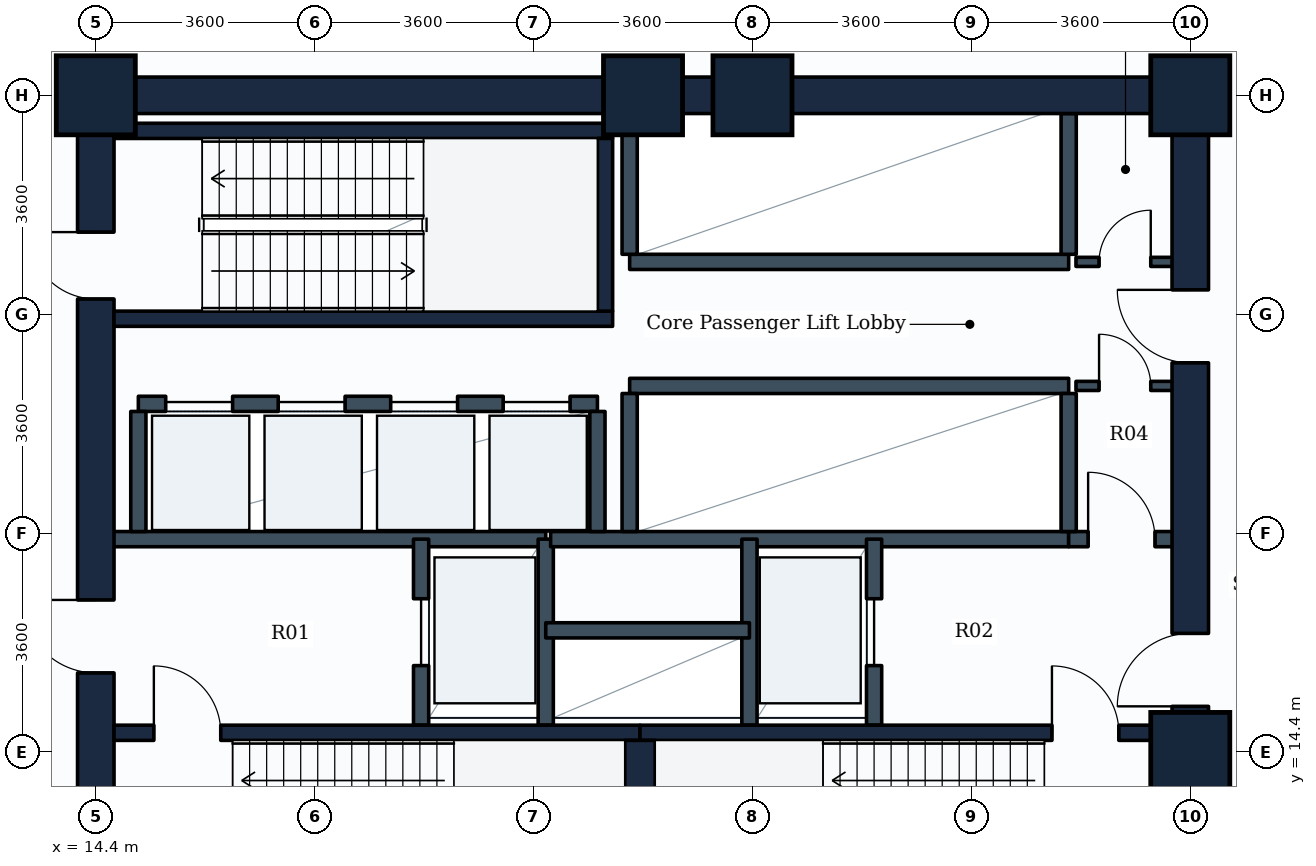
"""IFC4 building model, lengths in metres.
Left out: names, types, materials, properties, quantities, classifications, styles, units other than length and angle.
Written with IfcOpenShell. Run it as: python <this file> out.ifc"""

import sys

from ifc_helpers import new_model, si_unit, direction, frame, frame_2d, origin, origin_2d, place, context, subcontext, project, spatial, rectangle, extrude, element, fill, save


model = new_model("IFC4")
c1 = context("Model", 3, precision=1e-05, world=origin(), true_north=direction((0.0, 1.0)))
c2 = subcontext(c1, "Body", "Model", "MODEL_VIEW")
j1 = project(units=[si_unit("LENGTHUNIT", "METRE"), si_unit("PLANEANGLEUNIT", "RADIAN")], contexts=[c1])
p1 = place(None, origin())
s1 = spatial("IfcSite", under=j1, at=p1, CompositionType="ELEMENT")
p2 = place(p1, origin())
s2 = spatial("IfcBuilding", under=s1, at=p2, CompositionType="ELEMENT")
p3 = place(p2, frame((0.0, 0.0, 10.2)))
s3 = spatial("IfcBuildingStorey", under=s2, at=p3, CompositionType="ELEMENT", Elevation=10.2)
for number, where, z_axis, x_axis in (
    (1, (14.4, 25.2, 0.0), (0.0, 0.0, 1.0), (1.0, 0.0, 0.0)),
    (2, (23.4, 25.2, 0.0), (0.0, 0.0, 1.0), (1.0, 0.0, 0.0)),
    (3, (25.2, 25.2, 0.0), (0.0, 0.0, 1.0), (1.0, 0.0, 0.0)),
    (4, (32.4, 14.4, 0.0), (0.0, 0.0, 1.0), (1.0, 0.0, 0.0)),
    (5, (32.4, 25.2, 0.0), (0.0, 0.0, 1.0), (1.0, 0.0, 0.0)),
):
    element("IfcColumn", number, at=place(p3, frame(where, z_axis=z_axis, x_axis=x_axis)), inside=s3, PredefinedType="COLUMN", context=c2, shape_type="SweptSolid", body=[
        extrude(rectangle(XDim=1.3, YDim=1.3, at=origin_2d()), origin(), (0.0, 0.0, 1.0), 4.6),
    ])
p4 = place(p3, frame((14.4, 25.2, 0.0), z_axis=(0.0, 0.0, 1.0), x_axis=(1.0, 0.0, 0.0)))
e6 = element("IfcWall", 6, at=p4, inside=s3, PredefinedType="SHEAR", context=c2, shape_type="SweptSolid", body=[
    extrude(rectangle(XDim=18.0, YDim=0.6, at=frame_2d((9.0, 0.0))), origin(), (0.0, 0.0, 1.0), 4.3),
])
p5 = place(p3, frame((14.4, 10.8, 0.0), z_axis=(0.0, 0.0, 1.0), x_axis=(0.0, 1.0, 0.0)))
e7 = element("IfcWall", 7, at=p5, inside=s3, PredefinedType="SHEAR", context=c2, shape_type="SweptSolid", body=[
    extrude(rectangle(XDim=14.4, YDim=0.6, at=frame_2d((7.2, 0.0))), origin(), (0.0, 0.0, 1.0), 4.3),
])
p6 = place(p5, frame((11.05, 0.0, 0.0)))
e8 = element("IfcOpeningElement", 8, at=p6, cuts=e7, PredefinedType="OPENING", context=c2, shape_type="SweptSolid", body=[
    extrude(rectangle(XDim=1.1, YDim=2.1, at=frame_2d((0.55, 1.05))), frame((0.0, 0.31, 0.0), z_axis=(0.0, -1.0, 0.0), x_axis=(1.0, 0.0, 0.0)), (0.0, 0.0, 1.0), 0.62),
])
p7 = place(p5, frame((4.9, 0.0, 0.0)))
e9 = element("IfcOpeningElement", 9, at=p7, cuts=e7, PredefinedType="OPENING", context=c2, shape_type="SweptSolid", body=[
    extrude(rectangle(XDim=1.2, YDim=2.1, at=frame_2d((0.6, 1.05))), frame((0.0, 0.31, 0.0), z_axis=(0.0, -1.0, 0.0), x_axis=(1.0, 0.0, 0.0)), (0.0, 0.0, 1.0), 0.62),
])
p8 = place(p3, frame((32.4, 10.8, 0.0), z_axis=(0.0, 0.0, 1.0), x_axis=(0.0, 1.0, 0.0)))
e10 = element("IfcWall", 10, at=p8, inside=s3, PredefinedType="SHEAR", context=c2, shape_type="SweptSolid", body=[
    extrude(rectangle(XDim=14.4, YDim=0.6, at=frame_2d((7.2, 0.0))), origin(), (0.0, 0.0, 1.0), 4.3),
])
p9 = place(p8, frame((4.35, 0.0, 0.0)))
e11 = element("IfcOpeningElement", 11, at=p9, cuts=e10, PredefinedType="OPENING", context=c2, shape_type="SweptSolid", body=[
    extrude(rectangle(XDim=1.2, YDim=2.1, at=frame_2d((0.6, 1.05))), frame((0.0, 0.31, 0.0), z_axis=(0.0, -1.0, 0.0), x_axis=(1.0, 0.0, 0.0)), (0.0, 0.0, 1.0), 0.62),
])
p10 = place(p8, frame((10.0, 0.0, 0.0)))
e12 = element("IfcOpeningElement", 12, at=p10, cuts=e10, PredefinedType="OPENING", context=c2, shape_type="SweptSolid", body=[
    extrude(rectangle(XDim=1.2, YDim=2.1, at=frame_2d((0.6, 1.05))), frame((0.0, 0.31, 0.0), z_axis=(0.0, -1.0, 0.0), x_axis=(1.0, 0.0, 0.0)), (0.0, 0.0, 1.0), 0.62),
])
p11 = place(p3, frame((14.7, 14.715, 0.0), z_axis=(0.0, 0.0, 1.0), x_axis=(1.0, 0.0, 0.0)))
e13 = element("IfcWall", 13, at=p11, inside=s3, PredefinedType="SHEAR", context=c2, shape_type="SweptSolid", body=[
    extrude(rectangle(XDim=8.65, YDim=0.25, at=frame_2d((4.325, 0.0))), origin(), (0.0, 0.0, 1.0), 4.3),
])
p12 = place(p11, frame((0.655, 0.0, 0.0)))
e14 = element("IfcOpeningElement", 14, at=p12, cuts=e13, PredefinedType="OPENING", context=c2, shape_type="SweptSolid", body=[
    extrude(rectangle(XDim=1.1, YDim=2.1, at=frame_2d((0.55, 1.05))), frame((0.0, 0.135, 0.0), z_axis=(0.0, -1.0, 0.0), x_axis=(1.0, 0.0, 0.0)), (0.0, 0.0, 1.0), 0.27),
])
p13 = place(p3, frame((23.35, 14.715, 0.0), z_axis=(0.0, 0.0, 1.0), x_axis=(1.0, 0.0, 0.0)))
e15 = element("IfcWall", 15, at=p13, inside=s3, PredefinedType="SHEAR", context=c2, shape_type="SweptSolid", body=[
    extrude(rectangle(XDim=8.75, YDim=0.25, at=frame_2d((4.375, 0.0))), origin(), (0.0, 0.0, 1.0), 4.3),
])
p14 = place(p13, frame((6.775, 0.0, 0.0)))
e16 = element("IfcOpeningElement", 16, at=p14, cuts=e15, PredefinedType="OPENING", context=c2, shape_type="SweptSolid", body=[
    extrude(rectangle(XDim=1.1, YDim=2.1, at=frame_2d((0.55, 1.05))), frame((0.0, 0.135, 0.0), z_axis=(0.0, -1.0, 0.0), x_axis=(1.0, 0.0, 0.0)), (0.0, 0.0, 1.0), 0.27),
])
p15 = place(p3, frame((23.35, 11.75, 0.0), z_axis=(0.0, 0.0, 1.0), x_axis=(0.0, 1.0, 0.0)))
e17 = element("IfcWall", 17, at=p15, inside=s3, PredefinedType="SHEAR", context=c2, shape_type="SweptSolid", body=[
    extrude(rectangle(XDim=2.84, YDim=0.5, at=frame_2d((1.42, 0.0))), origin(), (0.0, 0.0, 1.0), 4.3),
])
for number, where, z_axis, x_axis in (
    (18, (14.7, 21.525, 0.0), (0.0, 0.0, 1.0), (1.0, 0.0, 0.0)),
    (19, (14.7, 24.615, 0.0), (0.0, 0.0, 1.0), (1.0, 0.0, 0.0)),
):
    element("IfcWall", number, at=place(p3, frame(where, z_axis=z_axis, x_axis=x_axis)), inside=s3, PredefinedType="SHEAR", context=c2, shape_type="SweptSolid", body=[
        extrude(rectangle(XDim=8.2, YDim=0.25, at=frame_2d((4.1, 0.0))), origin(), (0.0, 0.0, 1.0), 4.3),
    ])
p16 = place(p3, frame((22.775, 21.65, 0.0), z_axis=(0.0, 0.0, 1.0), x_axis=(0.0, 1.0, 0.0)))
e20 = element("IfcWall", 20, at=p16, inside=s3, PredefinedType="SHEAR", context=c2, shape_type="SweptSolid", body=[
    extrude(rectangle(XDim=2.84, YDim=0.25, at=frame_2d((1.42, 0.0))), origin(), (0.0, 0.0, 1.0), 4.3),
])
p17 = place(p3, frame((14.65, 17.9, 0.0), z_axis=(0.0, 0.0, 1.0), x_axis=(1.0, 0.0, 0.0)))
e21 = element("IfcWall", 21, at=p17, inside=s3, PredefinedType="PARTITIONING", context=c2, shape_type="SweptSolid", body=[
    extrude(rectangle(XDim=7.15, YDim=0.25, at=frame_2d((3.575, 0.0))), origin(), (0.0, 0.0, 1.0), 4.285),
])
p18 = place(p3, frame((19.75, 14.84, 0.0), z_axis=(0.0, 0.0, 1.0), x_axis=(0.0, 1.0, 0.0)))
e22 = element("IfcWall", 22, at=p18, inside=s3, PredefinedType="PARTITIONING", context=c2, shape_type="SweptSolid", body=[
    extrude(rectangle(XDim=3.06, YDim=0.25, at=frame_2d((1.53, 0.0))), origin(), (0.0, 0.0, 1.0), 4.285),
])
p19 = place(p18, frame((0.98, 0.0, 0.0)))
e23 = element("IfcOpeningElement", 23, at=p19, cuts=e22, PredefinedType="OPENING", context=c2, shape_type="SweptSolid", body=[
    extrude(rectangle(XDim=1.1, YDim=2.1, at=frame_2d((0.55, 1.05))), frame((0.0, 0.135, 0.0), z_axis=(0.0, -1.0, 0.0), x_axis=(1.0, 0.0, 0.0)), (0.0, 0.0, 1.0), 0.27),
])
p20 = place(p3, frame((21.8, 14.84, 0.0), z_axis=(0.0, 0.0, 1.0), x_axis=(0.0, 1.0, 0.0)))
e24 = element("IfcWall", 24, at=p20, inside=s3, PredefinedType="PARTITIONING", context=c2, shape_type="SweptSolid", body=[
    extrude(rectangle(XDim=3.06, YDim=0.25, at=frame_2d((1.53, 0.0))), origin(), (0.0, 0.0, 1.0), 4.285),
])
p21 = place(p3, frame((21.88, 17.9, 0.0), z_axis=(0.0, 0.0, 1.0), x_axis=(1.0, 0.0, 0.0)))
e25 = element("IfcWall", 25, at=p21, inside=s3, PredefinedType="PARTITIONING", context=c2, shape_type="SweptSolid", body=[
    extrude(rectangle(XDim=8.52, YDim=0.25, at=frame_2d((4.26, 0.0))), origin(), (0.0, 0.0, 1.0), 4.285),
])
p22 = place(p3, frame((30.4, 17.9, 0.0), z_axis=(0.0, 0.0, 1.0), x_axis=(1.0, 0.0, 0.0)))
e26 = element("IfcWall", 26, at=p22, inside=s3, PredefinedType="PARTITIONING", context=c2, shape_type="SweptSolid", body=[
    extrude(rectangle(XDim=1.75, YDim=0.25, at=frame_2d((0.875, 0.0))), origin(), (0.0, 0.0, 1.0), 4.285),
])
p23 = place(p22, frame((0.32, 0.0, 0.0)))
e27 = element("IfcOpeningElement", 27, at=p23, cuts=e26, PredefinedType="OPENING", context=c2, shape_type="SweptSolid", body=[
    extrude(rectangle(XDim=1.1, YDim=2.1, at=frame_2d((0.55, 1.05))), frame((0.0, 0.135, 0.0), z_axis=(0.0, -1.0, 0.0), x_axis=(1.0, 0.0, 0.0)), (0.0, 0.0, 1.0), 0.27),
])
p24 = place(p3, frame((25.15, 14.84, 0.0), z_axis=(0.0, 0.0, 1.0), x_axis=(0.0, 1.0, 0.0)))
e28 = element("IfcWall", 28, at=p24, inside=s3, PredefinedType="PARTITIONING", context=c2, shape_type="SweptSolid", body=[
    extrude(rectangle(XDim=3.06, YDim=0.25, at=frame_2d((1.53, 0.0))), origin(), (0.0, 0.0, 1.0), 4.285),
])
p25 = place(p3, frame((27.2, 14.84, 0.0), z_axis=(0.0, 0.0, 1.0), x_axis=(0.0, 1.0, 0.0)))
e29 = element("IfcWall", 29, at=p25, inside=s3, PredefinedType="PARTITIONING", context=c2, shape_type="SweptSolid", body=[
    extrude(rectangle(XDim=3.06, YDim=0.25, at=frame_2d((1.53, 0.0))), origin(), (0.0, 0.0, 1.0), 4.285),
])
p26 = place(p25, frame((0.98, 0.0, 0.0)))
e30 = element("IfcOpeningElement", 30, at=p26, cuts=e29, PredefinedType="OPENING", context=c2, shape_type="SweptSolid", body=[
    extrude(rectangle(XDim=1.1, YDim=2.1, at=frame_2d((0.55, 1.05))), frame((0.0, 0.135, 0.0), z_axis=(0.0, -1.0, 0.0), x_axis=(1.0, 0.0, 0.0)), (0.0, 0.0, 1.0), 0.27),
])
p27 = place(p3, frame((21.8, 16.4, 0.0), z_axis=(0.0, 0.0, 1.0), x_axis=(1.0, 0.0, 0.0)))
e31 = element("IfcWall", 31, at=p27, inside=s3, PredefinedType="PARTITIONING", context=c2, shape_type="SweptSolid", body=[
    extrude(rectangle(XDim=3.35, YDim=0.25, at=frame_2d((1.675, 0.0))), origin(), (0.0, 0.0, 1.0), 4.285),
])
p28 = place(p3, frame((15.1, 20.125, 0.0), z_axis=(0.0, 0.0, 1.0), x_axis=(1.0, 0.0, 0.0)))
e32 = element("IfcWall", 32, at=p28, inside=s3, PredefinedType="PARTITIONING", context=c2, shape_type="SweptSolid", body=[
    extrude(rectangle(XDim=7.55, YDim=0.25, at=frame_2d((3.775, 0.0))), origin(), (0.0, 0.0, 1.0), 4.285),
])
p29 = place(p28, frame((0.45, 0.0, 0.0)))
e33 = element("IfcOpeningElement", 33, at=p29, cuts=e32, PredefinedType="OPENING", context=c2, shape_type="SweptSolid", body=[
    extrude(rectangle(XDim=1.1, YDim=2.1, at=frame_2d((0.55, 1.05))), frame((0.0, 0.135, 0.0), z_axis=(0.0, -1.0, 0.0), x_axis=(1.0, 0.0, 0.0)), (0.0, 0.0, 1.0), 0.27),
])
p30 = place(p28, frame((2.3, 0.0, 0.0)))
e34 = element("IfcOpeningElement", 34, at=p30, cuts=e32, PredefinedType="OPENING", context=c2, shape_type="SweptSolid", body=[
    extrude(rectangle(XDim=1.1, YDim=2.1, at=frame_2d((0.55, 1.05))), frame((0.0, 0.135, 0.0), z_axis=(0.0, -1.0, 0.0), x_axis=(1.0, 0.0, 0.0)), (0.0, 0.0, 1.0), 0.27),
])
p31 = place(p28, frame((4.15, 0.0, 0.0)))
e35 = element("IfcOpeningElement", 35, at=p31, cuts=e32, PredefinedType="OPENING", context=c2, shape_type="SweptSolid", body=[
    extrude(rectangle(XDim=1.1, YDim=2.1, at=frame_2d((0.55, 1.05))), frame((0.0, 0.135, 0.0), z_axis=(0.0, -1.0, 0.0), x_axis=(1.0, 0.0, 0.0)), (0.0, 0.0, 1.0), 0.27),
])
p32 = place(p28, frame((6.0, 0.0, 0.0)))
e36 = element("IfcOpeningElement", 36, at=p32, cuts=e32, PredefinedType="OPENING", context=c2, shape_type="SweptSolid", body=[
    extrude(rectangle(XDim=1.1, YDim=2.1, at=frame_2d((0.55, 1.05))), frame((0.0, 0.135, 0.0), z_axis=(0.0, -1.0, 0.0), x_axis=(1.0, 0.0, 0.0)), (0.0, 0.0, 1.0), 0.27),
])
for number, where, z_axis, x_axis in (
    (37, (15.1, 18.025, 0.0), (0.0, 0.0, 1.0), (0.0, 1.0, 0.0)),
    (38, (22.65, 18.025, 0.0), (0.0, 0.0, 1.0), (0.0, 1.0, 0.0)),
):
    element("IfcWall", number, at=place(p3, frame(where, z_axis=z_axis, x_axis=x_axis)), inside=s3, PredefinedType="PARTITIONING", context=c2, shape_type="SweptSolid", body=[
        extrude(rectangle(XDim=1.975, YDim=0.25, at=frame_2d((0.988, 0.0))), origin(), (0.0, 0.0, 1.0), 4.285),
    ])
p33 = place(p3, frame((23.18, 20.42, 0.0), z_axis=(0.0, 0.0, 1.0), x_axis=(1.0, 0.0, 0.0)))
e39 = element("IfcWall", 39, at=p33, inside=s3, PredefinedType="PARTITIONING", context=c2, shape_type="SweptSolid", body=[
    extrude(rectangle(XDim=7.22, YDim=0.25, at=frame_2d((3.61, 0.0))), origin(), (0.0, 0.0, 1.0), 4.285),
])
for number, where, z_axis, x_axis in (
    (40, (23.18, 18.025, 0.0), (0.0, 0.0, 1.0), (0.0, 1.0, 0.0)),
    (41, (30.4, 18.025, 0.0), (0.0, 0.0, 1.0), (0.0, 1.0, 0.0)),
):
    element("IfcWall", number, at=place(p3, frame(where, z_axis=z_axis, x_axis=x_axis)), inside=s3, PredefinedType="PARTITIONING", context=c2, shape_type="SweptSolid", body=[
        extrude(rectangle(XDim=2.27, YDim=0.25, at=frame_2d((1.135, 0.0))), origin(), (0.0, 0.0, 1.0), 4.285),
    ])
p34 = place(p3, frame((23.18, 22.46, 0.0), z_axis=(0.0, 0.0, 1.0), x_axis=(1.0, 0.0, 0.0)))
e42 = element("IfcWall", 42, at=p34, inside=s3, PredefinedType="PARTITIONING", context=c2, shape_type="SweptSolid", body=[
    extrude(rectangle(XDim=7.22, YDim=0.25, at=frame_2d((3.61, 0.0))), origin(), (0.0, 0.0, 1.0), 4.285),
])
for number, where, z_axis, x_axis in (
    (43, (23.18, 22.585, 0.0), (0.0, 0.0, 1.0), (0.0, 1.0, 0.0)),
    (44, (30.4, 22.585, 0.0), (0.0, 0.0, 1.0), (0.0, 1.0, 0.0)),
):
    element("IfcWall", number, at=place(p3, frame(where, z_axis=z_axis, x_axis=x_axis)), inside=s3, PredefinedType="PARTITIONING", context=c2, shape_type="SweptSolid", body=[
        extrude(rectangle(XDim=2.315, YDim=0.25, at=frame_2d((1.157, 0.0))), origin(), (0.0, 0.0, 1.0), 4.285),
    ])
p35 = place(p3, frame((30.52, 22.46, 0.0), z_axis=(0.0, 0.0, 1.0), x_axis=(1.0, 0.0, 0.0)))
e45 = element("IfcWall", 45, at=p35, inside=s3, PredefinedType="PARTITIONING", context=c2, shape_type="SweptSolid", body=[
    extrude(rectangle(XDim=1.63, YDim=0.15, at=frame_2d((0.815, 0.0))), origin(), (0.0, 0.0, 1.0), 4.285),
])
p36 = place(p35, frame((0.38, 0.0, 0.0)))
e46 = element("IfcOpeningElement", 46, at=p36, cuts=e45, PredefinedType="OPENING", context=c2, shape_type="SweptSolid", body=[
    extrude(rectangle(XDim=0.85, YDim=2.1, at=frame_2d((0.425, 1.05))), frame((0.0, 0.085, 0.0), z_axis=(0.0, -1.0, 0.0), x_axis=(1.0, 0.0, 0.0)), (0.0, 0.0, 1.0), 0.17),
])
p37 = place(p3, frame((30.52, 20.42, 0.0), z_axis=(0.0, 0.0, 1.0), x_axis=(1.0, 0.0, 0.0)))
e47 = element("IfcWall", 47, at=p37, inside=s3, PredefinedType="PARTITIONING", context=c2, shape_type="SweptSolid", body=[
    extrude(rectangle(XDim=1.63, YDim=0.15, at=frame_2d((0.815, 0.0))), origin(), (0.0, 0.0, 1.0), 4.285),
])
p38 = place(p37, frame((0.38, 0.0, 0.0)))
e48 = element("IfcOpeningElement", 48, at=p38, cuts=e47, PredefinedType="OPENING", context=c2, shape_type="SweptSolid", body=[
    extrude(rectangle(XDim=0.85, YDim=2.1, at=frame_2d((0.425, 1.05))), frame((0.0, 0.085, 0.0), z_axis=(0.0, -1.0, 0.0), x_axis=(1.0, 0.0, 0.0)), (0.0, 0.0, 1.0), 0.17),
])
p39 = place(p12, origin())
e49 = element("IfcDoor", 49, at=p39, inside=s3, OperationType="SINGLE_SWING_LEFT", PredefinedType="DOOR", context=c2, shape_type="SweptSolid", body=[
    extrude(rectangle(XDim=1.1, YDim=2.1, at=frame_2d((0.55, 1.05))), frame((0.0, 0.025, 0.0), z_axis=(0.0, -1.0, 0.0), x_axis=(1.0, 0.0, 0.0)), (0.0, 0.0, 1.0), 0.05),
])
fill(e14, e49)
p40 = place(p14, origin())
e50 = element("IfcDoor", 50, at=p40, inside=s3, OperationType="SINGLE_SWING_LEFT", PredefinedType="DOOR", context=c2, shape_type="SweptSolid", body=[
    extrude(rectangle(XDim=1.1, YDim=2.1, at=frame_2d((0.55, 1.05))), frame((0.0, 0.025, 0.0), z_axis=(0.0, -1.0, 0.0), x_axis=(1.0, 0.0, 0.0)), (0.0, 0.0, 1.0), 0.05),
])
fill(e16, e50)
p41 = place(p6, origin())
e51 = element("IfcDoor", 51, at=p41, inside=s3, OperationType="SINGLE_SWING_RIGHT", PredefinedType="DOOR", context=c2, shape_type="SweptSolid", body=[
    extrude(rectangle(XDim=1.1, YDim=2.1, at=frame_2d((0.55, 1.05))), frame((0.0, 0.025, 0.0), z_axis=(0.0, -1.0, 0.0), x_axis=(1.0, 0.0, 0.0)), (0.0, 0.0, 1.0), 0.05),
])
fill(e8, e51)
p42 = place(p19, origin())
e52 = element("IfcDoor", 52, at=p42, inside=s3, OperationType="SLIDING_TO_LEFT", PredefinedType="DOOR", context=c2, shape_type="SweptSolid", body=[
    extrude(rectangle(XDim=1.1, YDim=2.1, at=frame_2d((0.55, 1.05))), frame((0.0, 0.025, 0.0), z_axis=(0.0, -1.0, 0.0), x_axis=(1.0, 0.0, 0.0)), (0.0, 0.0, 1.0), 0.05),
])
fill(e23, e52)
p43 = place(p26, origin())
e53 = element("IfcDoor", 53, at=p43, inside=s3, OperationType="SLIDING_TO_LEFT", PredefinedType="DOOR", context=c2, shape_type="SweptSolid", body=[
    extrude(rectangle(XDim=1.1, YDim=2.1, at=frame_2d((0.55, 1.05))), frame((0.0, 0.025, 0.0), z_axis=(0.0, -1.0, 0.0), x_axis=(1.0, 0.0, 0.0)), (0.0, 0.0, 1.0), 0.05),
])
fill(e30, e53)
p44 = place(p7, origin())
e54 = element("IfcDoor", 54, at=p44, inside=s3, OperationType="SINGLE_SWING_RIGHT", PredefinedType="DOOR", context=c2, shape_type="SweptSolid", body=[
    extrude(rectangle(XDim=1.2, YDim=2.1, at=frame_2d((0.6, 1.05))), frame((0.0, 0.025, 0.0), z_axis=(0.0, -1.0, 0.0), x_axis=(1.0, 0.0, 0.0)), (0.0, 0.0, 1.0), 0.05),
])
fill(e9, e54)
p45 = place(p9, origin())
e55 = element("IfcDoor", 55, at=p45, inside=s3, OperationType="SINGLE_SWING_LEFT", PredefinedType="DOOR", context=c2, shape_type="SweptSolid", body=[
    extrude(rectangle(XDim=1.2, YDim=2.1, at=frame_2d((0.6, 1.05))), frame((0.0, 0.025, 0.0), z_axis=(0.0, -1.0, 0.0), x_axis=(1.0, 0.0, 0.0)), (0.0, 0.0, 1.0), 0.05),
])
fill(e11, e55)
p46 = place(p23, origin())
e56 = element("IfcDoor", 56, at=p46, inside=s3, OperationType="SINGLE_SWING_LEFT", PredefinedType="DOOR", context=c2, shape_type="SweptSolid", body=[
    extrude(rectangle(XDim=1.1, YDim=2.1, at=frame_2d((0.55, 1.05))), frame((0.0, 0.025, 0.0), z_axis=(0.0, -1.0, 0.0), x_axis=(1.0, 0.0, 0.0)), (0.0, 0.0, 1.0), 0.05),
])
fill(e27, e56)
p47 = place(p29, origin())
e57 = element("IfcDoor", 57, at=p47, inside=s3, OperationType="SLIDING_TO_LEFT", PredefinedType="DOOR", context=c2, shape_type="SweptSolid", body=[
    extrude(rectangle(XDim=1.1, YDim=2.1, at=frame_2d((0.55, 1.05))), frame((0.0, 0.025, 0.0), z_axis=(0.0, -1.0, 0.0), x_axis=(1.0, 0.0, 0.0)), (0.0, 0.0, 1.0), 0.05),
])
fill(e33, e57)
p48 = place(p30, origin())
e58 = element("IfcDoor", 58, at=p48, inside=s3, OperationType="SLIDING_TO_LEFT", PredefinedType="DOOR", context=c2, shape_type="SweptSolid", body=[
    extrude(rectangle(XDim=1.1, YDim=2.1, at=frame_2d((0.55, 1.05))), frame((0.0, 0.025, 0.0), z_axis=(0.0, -1.0, 0.0), x_axis=(1.0, 0.0, 0.0)), (0.0, 0.0, 1.0), 0.05),
])
fill(e34, e58)
p49 = place(p31, origin())
e59 = element("IfcDoor", 59, at=p49, inside=s3, OperationType="SLIDING_TO_LEFT", PredefinedType="DOOR", context=c2, shape_type="SweptSolid", body=[
    extrude(rectangle(XDim=1.1, YDim=2.1, at=frame_2d((0.55, 1.05))), frame((0.0, 0.025, 0.0), z_axis=(0.0, -1.0, 0.0), x_axis=(1.0, 0.0, 0.0)), (0.0, 0.0, 1.0), 0.05),
])
fill(e35, e59)
p50 = place(p32, origin())
e60 = element("IfcDoor", 60, at=p50, inside=s3, OperationType="SLIDING_TO_LEFT", PredefinedType="DOOR", context=c2, shape_type="SweptSolid", body=[
    extrude(rectangle(XDim=1.1, YDim=2.1, at=frame_2d((0.55, 1.05))), frame((0.0, 0.025, 0.0), z_axis=(0.0, -1.0, 0.0), x_axis=(1.0, 0.0, 0.0)), (0.0, 0.0, 1.0), 0.05),
])
fill(e36, e60)
p51 = place(p10, origin())
e61 = element("IfcDoor", 61, at=p51, inside=s3, OperationType="SINGLE_SWING_RIGHT", PredefinedType="DOOR", context=c2, shape_type="SweptSolid", body=[
    extrude(rectangle(XDim=1.2, YDim=2.1, at=frame_2d((0.6, 1.05))), frame((0.0, 0.025, 0.0), z_axis=(0.0, -1.0, 0.0), x_axis=(1.0, 0.0, 0.0)), (0.0, 0.0, 1.0), 0.05),
])
fill(e12, e61)
p52 = place(p36, origin())
e62 = element("IfcDoor", 62, at=p52, inside=s3, OperationType="SINGLE_SWING_RIGHT", PredefinedType="DOOR", context=c2, shape_type="SweptSolid", body=[
    extrude(rectangle(XDim=0.85, YDim=2.1, at=frame_2d((0.425, 1.05))), frame((0.0, 0.025, 0.0), z_axis=(0.0, -1.0, 0.0), x_axis=(1.0, 0.0, 0.0)), (0.0, 0.0, 1.0), 0.05),
])
fill(e46, e62)
p53 = place(p38, origin())
e63 = element("IfcDoor", 63, at=p53, inside=s3, OperationType="SINGLE_SWING_LEFT", PredefinedType="DOOR", context=c2, shape_type="SweptSolid", body=[
    extrude(rectangle(XDim=0.85, YDim=2.1, at=frame_2d((0.425, 1.05))), frame((0.0, 0.025, 0.0), z_axis=(0.0, -1.0, 0.0), x_axis=(1.0, 0.0, 0.0)), (0.0, 0.0, 1.0), 0.05),
])
fill(e48, e63)
save(model, sys.argv[1])
